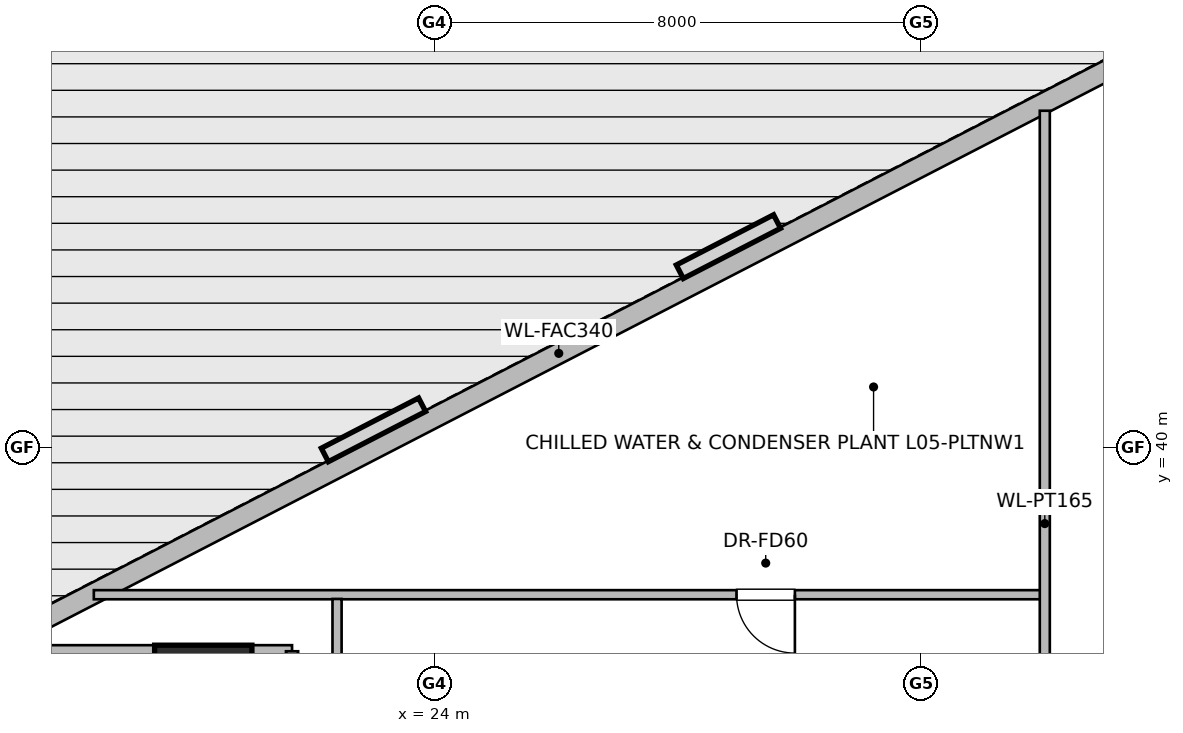
"""IFC4 building model, lengths in metres.
Left out: names, types, materials, properties, quantities, classifications, styles, units other than length and angle.
Written with IfcOpenShell. Run it as: python <this file> out.ifc"""

import sys

from ifc_helpers import new_model, si_unit, direction, frame, frame_2d, origin, origin_2d, place, context, subcontext, project, spatial, rectangle, extrude, element, fill, save


model = new_model("IFC4")
c1 = context("Model", 3, precision=1e-05, world=origin(), true_north=direction((0.0, 1.0)))
c2 = subcontext(c1, "Body", "Model", "MODEL_VIEW")
j1 = project(units=[si_unit("LENGTHUNIT", "METRE"), si_unit("PLANEANGLEUNIT", "RADIAN")], contexts=[c1])
p1 = place(None, origin())
s1 = spatial("IfcSite", under=j1, at=p1, CompositionType="ELEMENT")
p2 = place(p1, origin())
s2 = spatial("IfcBuilding", under=s1, at=p2, CompositionType="ELEMENT")
p3 = place(p2, frame((0.0, 0.0, 21.0)))
s3 = spatial("IfcBuildingStorey", under=s2, at=p3, CompositionType="ELEMENT", Elevation=21.0)
p4 = place(p3, frame((20.2, 35.95, 0.0), z_axis=(0.0, 0.0, 1.0), x_axis=(1.0, 0.0, 0.0)))
e1 = element("IfcColumn", 1, at=p4, inside=s3, PredefinedType="COLUMN", context=c2, shape_type="SweptSolid", body=[
    extrude(rectangle(XDim=1.6, YDim=1.6, at=origin_2d()), origin(), (0.0, 0.0, 1.0), 5.5),
])
p5 = place(p3, frame((16.924, 36.841, 0.0), z_axis=(0.0, 0.0, 1.0), x_axis=(0.888634413993, 0.458616264721, 0.0)))
e2 = element("IfcWall", 2, at=p5, inside=s3, PredefinedType="STANDARD", context=c2, shape_type="SweptSolid", body=[
    extrude(rectangle(XDim=20.531, YDim=0.34, at=frame_2d((10.266, 0.0))), origin(), (0.0, 0.0, 1.0), 3.6),
])
p6 = place(p3, frame((21.66, 36.65, 0.0), z_axis=(0.0, 0.0, 1.0), x_axis=(-1.0, 0.0, 0.0)))
e3 = element("IfcWall", 3, at=p6, inside=s3, PredefinedType="PARTITIONING", context=c2, shape_type="SweptSolid", body=[
    extrude(rectangle(XDim=4.46, YDim=0.2, at=frame_2d((2.23, 0.0))), origin(), (0.0, 0.0, 1.0), 5.58),
])
p7 = place(p3, frame((21.66, 34.915, 0.0), z_axis=(0.0, 0.0, 1.0), x_axis=(0.0, 1.0, 0.0)))
e4 = element("IfcWall", 4, at=p7, inside=s3, PredefinedType="PARTITIONING", context=c2, shape_type="SweptSolid", body=[
    extrude(rectangle(XDim=1.735, YDim=0.2, at=frame_2d((0.867, 0.0))), origin(), (0.0, 0.0, 1.0), 5.58),
])
p8 = place(p3, frame((34.0, 37.58, 0.0), z_axis=(0.0, 0.0, 1.0), x_axis=(-1.0, 0.0, 0.0)))
e5 = element("IfcWall", 5, at=p8, inside=s3, PredefinedType="PARTITIONING", context=c2, shape_type="SweptSolid", body=[
    extrude(rectangle(XDim=15.6, YDim=0.15, at=frame_2d((7.8, 0.0))), origin(), (0.0, 0.0, 1.0), 5.58),
])
p9 = place(p8, frame((4.07, 0.0, 0.0)))
e6 = element("IfcOpeningElement", 6, at=p9, cuts=e5, PredefinedType="OPENING", context=c2, shape_type="SweptSolid", body=[
    extrude(rectangle(XDim=0.96, YDim=2.0, at=frame_2d((0.48, 1.0))), frame((0.0, 0.085, 0.0), z_axis=(0.0, -1.0, 0.0), x_axis=(1.0, 0.0, 0.0)), (0.0, 0.0, 1.0), 0.17),
])
p10 = place(p3, frame((34.04, 31.96, 0.0), z_axis=(0.0, 0.0, 1.0), x_axis=(0.0, 1.0, 0.0)))
e7 = element("IfcWall", 7, at=p10, inside=s3, PredefinedType="PARTITIONING", context=c2, shape_type="SweptSolid", body=[
    extrude(rectangle(XDim=13.579, YDim=0.165, at=frame_2d((6.79, 0.0))), origin(), (0.0, 0.0, 1.0), 5.58),
])
p11 = place(p3, frame((22.4, 36.08, 0.0), z_axis=(0.0, 0.0, 1.0), x_axis=(0.0, 1.0, 0.0)))
e8 = element("IfcWall", 8, at=p11, inside=s3, PredefinedType="PARTITIONING", context=c2, shape_type="SweptSolid", body=[
    extrude(rectangle(XDim=1.43, YDim=0.15, at=frame_2d((0.715, 0.0))), origin(), (0.0, 0.0, 1.0), 5.58),
])
p12 = place(p9, origin())
e9 = element("IfcDoor", 9, at=p12, inside=s3, OperationType="SINGLE_SWING_LEFT", PredefinedType="DOOR", context=c2, shape_type="SweptSolid", body=[
    extrude(rectangle(XDim=0.96, YDim=2.0, at=frame_2d((0.48, 1.0))), frame((0.0, 0.025, 0.0), z_axis=(0.0, -1.0, 0.0), x_axis=(1.0, 0.0, 0.0)), (0.0, 0.0, 1.0), 0.05),
])
fill(e6, e9)
save(model, sys.argv[1])
